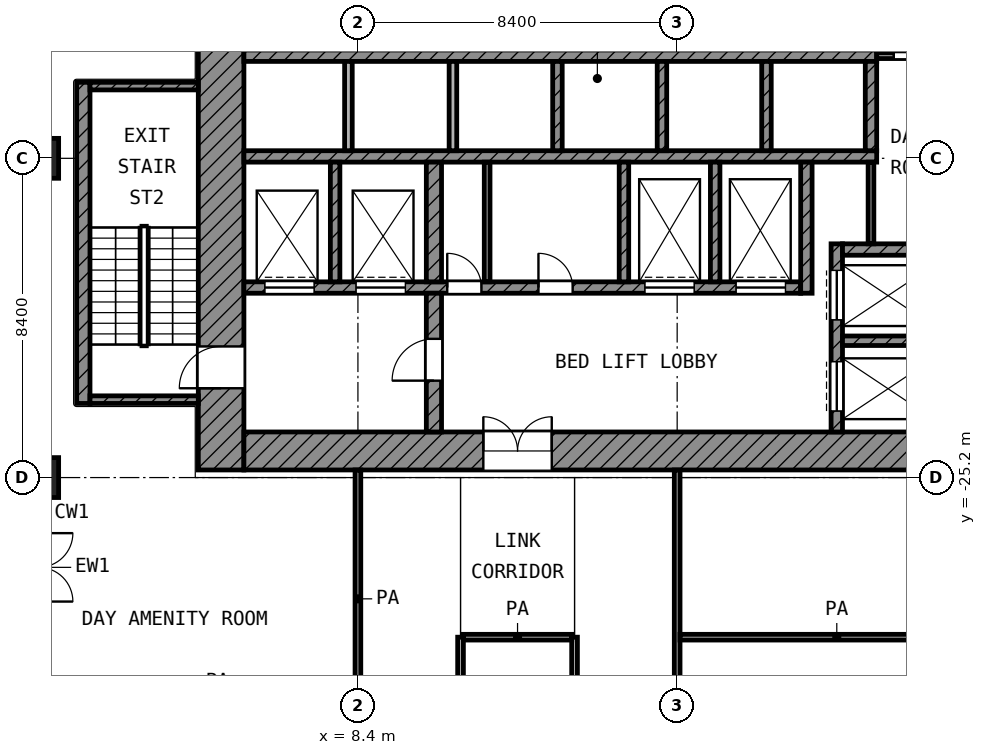
"""IFC4 building model, lengths in metres.
Left out: names, types, materials, properties, quantities, classifications, styles, units other than length and angle.
Written with IfcOpenShell. Run it as: python <this file> out.ifc"""

import sys

from ifc_helpers import new_model, si_unit, direction, frame, frame_2d, origin, origin_2d, place, context, subcontext, project, spatial, rectangle, extrude, element, fill, save


model = new_model("IFC4")
c1 = context("Model", 3, precision=1e-05, world=origin(), true_north=direction((0.0, 1.0)))
c2 = subcontext(c1, "Body", "Model", "MODEL_VIEW")
j1 = project(units=[si_unit("LENGTHUNIT", "METRE"), si_unit("PLANEANGLEUNIT", "RADIAN")], contexts=[c1])
p1 = place(None, origin())
s1 = spatial("IfcSite", under=j1, at=p1, CompositionType="ELEMENT")
p2 = place(p1, origin())
s2 = spatial("IfcBuilding", under=s1, at=p2, CompositionType="ELEMENT")
p3 = place(p2, frame((0.0, 0.0, 149.2)))
s3 = spatial("IfcBuildingStorey", under=s2, at=p3, CompositionType="ELEMENT", Elevation=149.2)
for number, where, z_axis, x_axis in (
    (1, (0.0, -16.8, 0.0), (0.0, 0.0, 1.0), (1.0, 0.0, 0.0)),
    (2, (0.0, -25.2, 0.0), (0.0, 0.0, 1.0), (1.0, 0.0, 0.0)),
):
    element("IfcColumn", number, at=place(p3, frame(where, z_axis=z_axis, x_axis=x_axis)), inside=s3, PredefinedType="COLUMN", context=c2, shape_type="SweptSolid", body=[
        extrude(rectangle(XDim=1.05, YDim=1.05, at=origin_2d()), origin(), (0.0, 0.0, 1.0), 4.2),
    ])
p4 = place(p3, frame((4.8, -25.0, 0.0), z_axis=(0.0, 0.0, 1.0), x_axis=(0.0, 1.0, 0.0)))
e3 = element("IfcWall", 3, at=p4, inside=s3, PredefinedType="SHEAR", context=c2, shape_type="SweptSolid", body=[
    extrude(rectangle(XDim=19.6, YDim=1.2, at=frame_2d((9.8, 0.0))), origin(), (0.0, 0.0, 1.0), 3.7),
])
p5 = place(p4, frame((11.45, 0.0, 0.0)))
e4 = element("IfcOpeningElement", 4, at=p5, cuts=e3, PredefinedType="OPENING", context=c2, shape_type="SweptSolid", body=[
    extrude(rectangle(XDim=1.1, YDim=2.1, at=frame_2d((0.55, 1.05))), frame((0.0, 0.61, 0.0), z_axis=(0.0, -1.0, 0.0), x_axis=(1.0, 0.0, 0.0)), (0.0, 0.0, 1.0), 1.22),
])
p6 = place(p4, frame((2.15, 0.0, 0.0)))
e5 = element("IfcOpeningElement", 5, at=p6, cuts=e3, PredefinedType="OPENING", context=c2, shape_type="SweptSolid", body=[
    extrude(rectangle(XDim=1.1, YDim=2.1, at=frame_2d((0.55, 1.05))), frame((0.0, 0.61, 0.0), z_axis=(0.0, -1.0, 0.0), x_axis=(1.0, 0.0, 0.0)), (0.0, 0.0, 1.0), 1.22),
])
p7 = place(p3, frame((5.4, -24.5, 0.0), z_axis=(0.0, 0.0, 1.0), x_axis=(1.0, 0.0, 0.0)))
e6 = element("IfcWall", 6, at=p7, inside=s3, PredefinedType="SHEAR", context=c2, shape_type="SweptSolid", body=[
    extrude(rectangle(XDim=18.6, YDim=1.0, at=frame_2d((9.3, 0.0))), origin(), (0.0, 0.0, 1.0), 3.7),
])
p8 = place(p7, frame((6.3, 0.0, 0.0)))
e7 = element("IfcOpeningElement", 7, at=p8, cuts=e6, PredefinedType="OPENING", context=c2, shape_type="SweptSolid", body=[
    extrude(rectangle(XDim=1.8, YDim=2.1, at=frame_2d((0.9, 1.05))), frame((0.0, 0.51, 0.0), z_axis=(0.0, -1.0, 0.0), x_axis=(1.0, 0.0, 0.0)), (0.0, 0.0, 1.0), 1.02),
])
for number, where, z_axis, x_axis in (
    (8, (5.4, -14.1, 0.0), (0.0, 0.0, 1.0), (1.0, 0.0, 0.0)),
    (9, (5.4, -16.75, 0.0), (0.0, 0.0, 1.0), (1.0, 0.0, 0.0)),
):
    element("IfcWall", number, at=place(p3, frame(where, z_axis=z_axis, x_axis=x_axis)), inside=s3, PredefinedType="SHEAR", context=c2, shape_type="SweptSolid", body=[
        extrude(rectangle(XDim=16.65, YDim=0.3, at=frame_2d((8.325, 0.0))), origin(), (0.0, 0.0, 1.0), 3.7),
    ])
p9 = place(p3, frame((5.4, -20.2, 0.0), z_axis=(0.0, 0.0, 1.0), x_axis=(1.0, 0.0, 0.0)))
e10 = element("IfcWall", 10, at=p9, inside=s3, PredefinedType="SHEAR", context=c2, shape_type="SweptSolid", body=[
    extrude(rectangle(XDim=14.65, YDim=0.3, at=frame_2d((7.325, 0.0))), origin(), (0.0, 0.0, 1.0), 3.7),
])
p10 = place(p9, frame((10.55, 0.0, 0.0)))
e11 = element("IfcOpeningElement", 11, at=p10, cuts=e10, PredefinedType="OPENING", context=c2, shape_type="SweptSolid", body=[
    extrude(rectangle(XDim=1.3, YDim=2.1, at=frame_2d((0.65, 1.05))), frame((0.0, 0.16, 0.0), z_axis=(0.0, -1.0, 0.0), x_axis=(1.0, 0.0, 0.0)), (0.0, 0.0, 1.0), 0.32),
])
p11 = place(p9, frame((12.95, 0.0, 0.0)))
e12 = element("IfcOpeningElement", 12, at=p11, cuts=e10, PredefinedType="OPENING", context=c2, shape_type="SweptSolid", body=[
    extrude(rectangle(XDim=1.3, YDim=2.1, at=frame_2d((0.65, 1.05))), frame((0.0, 0.16, 0.0), z_axis=(0.0, -1.0, 0.0), x_axis=(1.0, 0.0, 0.0)), (0.0, 0.0, 1.0), 0.32),
])
p12 = place(p9, frame((0.55, 0.0, 0.0)))
e13 = element("IfcOpeningElement", 13, at=p12, cuts=e10, PredefinedType="OPENING", context=c2, shape_type="SweptSolid", body=[
    extrude(rectangle(XDim=1.3, YDim=2.1, at=frame_2d((0.65, 1.05))), frame((0.0, 0.16, 0.0), z_axis=(0.0, -1.0, 0.0), x_axis=(1.0, 0.0, 0.0)), (0.0, 0.0, 1.0), 0.32),
])
p13 = place(p9, frame((2.95, 0.0, 0.0)))
e14 = element("IfcOpeningElement", 14, at=p13, cuts=e10, PredefinedType="OPENING", context=c2, shape_type="SweptSolid", body=[
    extrude(rectangle(XDim=1.3, YDim=2.1, at=frame_2d((0.65, 1.05))), frame((0.0, 0.16, 0.0), z_axis=(0.0, -1.0, 0.0), x_axis=(1.0, 0.0, 0.0)), (0.0, 0.0, 1.0), 0.32),
])
p14 = place(p9, frame((5.35, 0.0, 0.0)))
e15 = element("IfcOpeningElement", 15, at=p14, cuts=e10, PredefinedType="OPENING", context=c2, shape_type="SweptSolid", body=[
    extrude(rectangle(XDim=0.9, YDim=2.1, at=frame_2d((0.45, 1.05))), frame((0.0, 0.16, 0.0), z_axis=(0.0, -1.0, 0.0), x_axis=(1.0, 0.0, 0.0)), (0.0, 0.0, 1.0), 0.32),
])
p15 = place(p9, frame((7.75, 0.0, 0.0)))
e16 = element("IfcOpeningElement", 16, at=p15, cuts=e10, PredefinedType="OPENING", context=c2, shape_type="SweptSolid", body=[
    extrude(rectangle(XDim=0.9, YDim=2.1, at=frame_2d((0.45, 1.05))), frame((0.0, 0.16, 0.0), z_axis=(0.0, -1.0, 0.0), x_axis=(1.0, 0.0, 0.0)), (0.0, 0.0, 1.0), 0.32),
])
p16 = place(p3, frame((10.4, -24.0, 0.0), z_axis=(0.0, 0.0, 1.0), x_axis=(0.0, 1.0, 0.0)))
e17 = element("IfcWall", 17, at=p16, inside=s3, PredefinedType="SHEAR", context=c2, shape_type="SweptSolid", body=[
    extrude(rectangle(XDim=3.65, YDim=0.4, at=frame_2d((1.825, 0.0))), origin(), (0.0, 0.0, 1.0), 3.7),
])
p17 = place(p16, frame((1.35, 0.0, 0.0)))
e18 = element("IfcOpeningElement", 18, at=p17, cuts=e17, PredefinedType="OPENING", context=c2, shape_type="SweptSolid", body=[
    extrude(rectangle(XDim=1.1, YDim=2.1, at=frame_2d((0.55, 1.05))), frame((0.0, 0.21, 0.0), z_axis=(0.0, -1.0, 0.0), x_axis=(1.0, 0.0, 0.0)), (0.0, 0.0, 1.0), 0.42),
])
p18 = place(p3, frame((10.4, -20.05, 0.0), z_axis=(0.0, 0.0, 1.0), x_axis=(0.0, 1.0, 0.0)))
e19 = element("IfcWall", 19, at=p18, inside=s3, PredefinedType="SHEAR", context=c2, shape_type="SweptSolid", body=[
    extrude(rectangle(XDim=3.15, YDim=0.4, at=frame_2d((1.575, 0.0))), origin(), (0.0, 0.0, 1.0), 3.7),
])
p19 = place(p3, frame((20.2, -20.35, 0.0), z_axis=(0.0, 0.0, 1.0), x_axis=(0.0, 1.0, 0.0)))
e20 = element("IfcWall", 20, at=p19, inside=s3, PredefinedType="SHEAR", context=c2, shape_type="SweptSolid", body=[
    extrude(rectangle(XDim=3.45, YDim=0.3, at=frame_2d((1.725, 0.0))), origin(), (0.0, 0.0, 1.0), 3.7),
])
p20 = place(p3, frame((21.9, -16.6, 0.0), z_axis=(0.0, 0.0, 1.0), x_axis=(0.0, 1.0, 0.0)))
e21 = element("IfcWall", 21, at=p20, inside=s3, PredefinedType="SHEAR", context=c2, shape_type="SweptSolid", body=[
    extrude(rectangle(XDim=2.35, YDim=0.3, at=frame_2d((1.175, 0.0))), origin(), (0.0, 0.0, 1.0), 3.7),
])
p21 = place(p3, frame((21.15, -19.2, 0.0), z_axis=(0.0, 0.0, 1.0), x_axis=(1.0, 0.0, 0.0)))
e22 = element("IfcWall", 22, at=p21, inside=s3, PredefinedType="SHEAR", context=c2, shape_type="SweptSolid", body=[
    extrude(rectangle(XDim=2.85, YDim=0.3, at=frame_2d((1.425, 0.0))), origin(), (0.0, 0.0, 1.0), 3.7),
])
p22 = place(p3, frame((21.0, -24.0, 0.0), z_axis=(0.0, 0.0, 1.0), x_axis=(0.0, 1.0, 0.0)))
e23 = element("IfcWall", 23, at=p22, inside=s3, PredefinedType="SHEAR", context=c2, shape_type="SweptSolid", body=[
    extrude(rectangle(XDim=4.95, YDim=0.3, at=frame_2d((2.475, 0.0))), origin(), (0.0, 0.0, 1.0), 3.7),
])
p23 = place(p22, frame((2.95, 0.0, 0.0)))
e24 = element("IfcOpeningElement", 24, at=p23, cuts=e23, PredefinedType="OPENING", context=c2, shape_type="SweptSolid", body=[
    extrude(rectangle(XDim=1.3, YDim=2.1, at=frame_2d((0.65, 1.05))), frame((0.0, 0.16, 0.0), z_axis=(0.0, -1.0, 0.0), x_axis=(1.0, 0.0, 0.0)), (0.0, 0.0, 1.0), 0.32),
])
p24 = place(p22, frame((0.55, 0.0, 0.0)))
e25 = element("IfcOpeningElement", 25, at=p24, cuts=e23, PredefinedType="OPENING", context=c2, shape_type="SweptSolid", body=[
    extrude(rectangle(XDim=1.3, YDim=2.1, at=frame_2d((0.65, 1.05))), frame((0.0, 0.16, 0.0), z_axis=(0.0, -1.0, 0.0), x_axis=(1.0, 0.0, 0.0)), (0.0, 0.0, 1.0), 0.32),
])
p25 = place(p3, frame((21.15, -21.6, 0.0), z_axis=(0.0, 0.0, 1.0), x_axis=(1.0, 0.0, 0.0)))
e26 = element("IfcWall", 26, at=p25, inside=s3, PredefinedType="SHEAR", context=c2, shape_type="SweptSolid", body=[
    extrude(rectangle(XDim=2.85, YDim=0.25, at=frame_2d((1.425, 0.0))), origin(), (0.0, 0.0, 1.0), 3.7),
])
for number, where, z_axis, x_axis in (
    (27, (7.8, -20.05, 0.0), (0.0, 0.0, 1.0), (0.0, 1.0, 0.0)),
    (28, (15.4, -20.05, 0.0), (0.0, 0.0, 1.0), (0.0, 1.0, 0.0)),
    (29, (17.8, -20.05, 0.0), (0.0, 0.0, 1.0), (0.0, 1.0, 0.0)),
):
    element("IfcWall", number, at=place(p3, frame(where, z_axis=z_axis, x_axis=x_axis)), inside=s3, PredefinedType="SHEAR", context=c2, shape_type="SweptSolid", body=[
        extrude(rectangle(XDim=3.15, YDim=0.25, at=frame_2d((1.575, 0.0))), origin(), (0.0, 0.0, 1.0), 3.7),
    ])
for number, where, z_axis, x_axis in (
    (30, (8.15, -16.6, 0.0), (0.0, 0.0, 1.0), (0.0, 1.0, 0.0)),
    (31, (10.9, -16.6, 0.0), (0.0, 0.0, 1.0), (0.0, 1.0, 0.0)),
):
    element("IfcWall", number, at=place(p3, frame(where, z_axis=z_axis, x_axis=x_axis)), inside=s3, PredefinedType="PARTITIONING", context=c2, shape_type="SweptSolid", body=[
        extrude(rectangle(XDim=2.35, YDim=0.2, at=frame_2d((1.175, 0.0))), origin(), (0.0, 0.0, 1.0), 3.7),
    ])
for number, where, z_axis, x_axis in (
    (32, (13.65, -16.6, 0.0), (0.0, 0.0, 1.0), (0.0, 1.0, 0.0)),
    (33, (16.4, -16.6, 0.0), (0.0, 0.0, 1.0), (0.0, 1.0, 0.0)),
    (34, (19.15, -16.6, 0.0), (0.0, 0.0, 1.0), (0.0, 1.0, 0.0)),
):
    element("IfcWall", number, at=place(p3, frame(where, z_axis=z_axis, x_axis=x_axis)), inside=s3, PredefinedType="SHEAR", context=c2, shape_type="SweptSolid", body=[
        extrude(rectangle(XDim=2.35, YDim=0.25, at=frame_2d((1.175, 0.0))), origin(), (0.0, 0.0, 1.0), 3.7),
    ])
p26 = place(p3, frame((21.9, -19.05, 0.0), z_axis=(0.0, 0.0, 1.0), x_axis=(0.0, 1.0, 0.0)))
e35 = element("IfcWall", 35, at=p26, inside=s3, PredefinedType="PARTITIONING", context=c2, shape_type="SweptSolid", body=[
    extrude(rectangle(XDim=2.15, YDim=0.15, at=frame_2d((1.075, 0.0))), origin(), (0.0, 0.0, 1.0), 3.7),
])
p27 = place(p3, frame((22.05, -14.1, 0.0), z_axis=(0.0, 0.0, 1.0), x_axis=(1.0, 0.0, 0.0)))
e36 = element("IfcWall", 36, at=p27, inside=s3, PredefinedType="PARTITIONING", context=c2, shape_type="SweptSolid", body=[
    extrude(rectangle(XDim=1.95, YDim=0.15, at=frame_2d((0.975, 0.0))), origin(), (0.0, 0.0, 1.0), 3.7),
])
p28 = place(p27, frame((0.45, 0.0, 0.0)))
e37 = element("IfcOpeningElement", 37, at=p28, cuts=e36, PredefinedType="OPENING", context=c2, shape_type="SweptSolid", body=[
    extrude(rectangle(XDim=0.9, YDim=2.1, at=frame_2d((0.45, 1.05))), frame((0.0, 0.085, 0.0), z_axis=(0.0, -1.0, 0.0), x_axis=(1.0, 0.0, 0.0)), (0.0, 0.0, 1.0), 0.17),
])
p29 = place(p3, frame((11.8, -20.05, 0.0), z_axis=(0.0, 0.0, 1.0), x_axis=(0.0, 1.0, 0.0)))
e38 = element("IfcWall", 38, at=p29, inside=s3, PredefinedType="PARTITIONING", context=c2, shape_type="SweptSolid", body=[
    extrude(rectangle(XDim=3.15, YDim=0.15, at=frame_2d((1.575, 0.0))), origin(), (0.0, 0.0, 1.0), 3.7),
])
p30 = place(p3, frame((1.175, -23.25, 0.0), z_axis=(0.0, 0.0, 1.0), x_axis=(0.0, 1.0, 0.0)))
e39 = element("IfcWall", 39, at=p30, inside=s3, PredefinedType="SHEAR", context=c2, shape_type="SweptSolid", body=[
    extrude(rectangle(XDim=8.45, YDim=0.35, at=frame_2d((4.225, 0.0))), origin(), (0.0, 0.0, 1.0), 3.7),
])
for number, where, z_axis, x_axis in (
    (40, (1.35, -14.9, 0.0), (0.0, 0.0, 1.0), (1.0, 0.0, 0.0)),
    (41, (1.35, -23.15, 0.0), (0.0, 0.0, 1.0), (1.0, 0.0, 0.0)),
):
    element("IfcWall", number, at=place(p3, frame(where, z_axis=z_axis, x_axis=x_axis)), inside=s3, PredefinedType="SHEAR", context=c2, shape_type="SweptSolid", body=[
        extrude(rectangle(XDim=2.85, YDim=0.2, at=frame_2d((1.425, 0.0))), origin(), (0.0, 0.0, 1.0), 3.7),
    ])
p31 = place(p3, frame((11.175, -29.4, 0.0), z_axis=(0.0, 0.0, 1.0), x_axis=(1.0, 0.0, 0.0)))
e42 = element("IfcWall", 42, at=p31, inside=s3, PredefinedType="PARTITIONING", context=c2, shape_type="SweptSolid", body=[
    extrude(rectangle(XDim=2.85, YDim=0.15, at=frame_2d((1.425, 0.0))), origin(), (0.0, 0.0, 1.0), 3.7),
])
p32 = place(p3, frame((16.875, -29.4, 0.0), z_axis=(0.0, 0.0, 1.0), x_axis=(1.0, 0.0, 0.0)))
e43 = element("IfcWall", 43, at=p32, inside=s3, PredefinedType="PARTITIONING", context=c2, shape_type="SweptSolid", body=[
    extrude(rectangle(XDim=8.25, YDim=0.15, at=frame_2d((4.125, 0.0))), origin(), (0.0, 0.0, 1.0), 3.7),
])
p33 = place(p3, frame((8.4, -31.782, 0.0), z_axis=(0.0, 0.0, 1.0), x_axis=(0.0, 1.0, 0.0)))
e44 = element("IfcWall", 44, at=p33, inside=s3, PredefinedType="PARTITIONING", context=c2, shape_type="SweptSolid", body=[
    extrude(rectangle(XDim=6.782, YDim=0.15, at=frame_2d((3.391, 0.0))), origin(), (0.0, 0.0, 1.0), 3.7),
])
p34 = place(p3, frame((11.1, -46.7, 0.0), z_axis=(0.0, 0.0, 1.0), x_axis=(0.0, 1.0, 0.0)))
e45 = element("IfcWall", 45, at=p34, inside=s3, PredefinedType="PARTITIONING", context=c2, shape_type="SweptSolid", body=[
    extrude(rectangle(XDim=17.3, YDim=0.15, at=frame_2d((8.65, 0.0))), origin(), (0.0, 0.0, 1.0), 3.7),
])
p35 = place(p34, frame((14.7, 0.0, 0.0)))
e46 = element("IfcOpeningElement", 46, at=p35, cuts=e45, PredefinedType="OPENING", context=c2, shape_type="SweptSolid", body=[
    extrude(rectangle(XDim=1.0, YDim=2.1, at=frame_2d((0.5, 1.05))), frame((0.0, 0.085, 0.0), z_axis=(0.0, -1.0, 0.0), x_axis=(1.0, 0.0, 0.0)), (0.0, 0.0, 1.0), 0.17),
])
p36 = place(p3, frame((14.1, -46.7, 0.0), z_axis=(0.0, 0.0, 1.0), x_axis=(0.0, 1.0, 0.0)))
e47 = element("IfcWall", 47, at=p36, inside=s3, PredefinedType="PARTITIONING", context=c2, shape_type="SweptSolid", body=[
    extrude(rectangle(XDim=17.3, YDim=0.15, at=frame_2d((8.65, 0.0))), origin(), (0.0, 0.0, 1.0), 3.7),
])
p37 = place(p36, frame((5.9, 0.0, 0.0)))
e48 = element("IfcOpeningElement", 48, at=p37, cuts=e47, PredefinedType="OPENING", context=c2, shape_type="SweptSolid", body=[
    extrude(rectangle(XDim=1.2, YDim=2.1, at=frame_2d((0.6, 1.05))), frame((0.0, 0.085, 0.0), z_axis=(0.0, -1.0, 0.0), x_axis=(1.0, 0.0, 0.0)), (0.0, 0.0, 1.0), 0.17),
])
p38 = place(p3, frame((16.8, -58.72, 0.0), z_axis=(0.0, 0.0, 1.0), x_axis=(0.0, 1.0, 0.0)))
e49 = element("IfcWall", 49, at=p38, inside=s3, PredefinedType="PARTITIONING", context=c2, shape_type="SweptSolid", body=[
    extrude(rectangle(XDim=33.72, YDim=0.15, at=frame_2d((16.86, 0.0))), origin(), (0.0, 0.0, 1.0), 3.7),
])
p39 = place(p38, frame((25.72, 0.0, 0.0)))
e50 = element("IfcOpeningElement", 50, at=p39, cuts=e49, PredefinedType="OPENING", context=c2, shape_type="SweptSolid", body=[
    extrude(rectangle(XDim=1.5, YDim=2.1, at=frame_2d((0.75, 1.05))), frame((0.0, 0.085, 0.0), z_axis=(0.0, -1.0, 0.0), x_axis=(1.0, 0.0, 0.0)), (0.0, 0.0, 1.0), 0.17),
])
p40 = place(p38, frame((17.72, 0.0, 0.0)))
e51 = element("IfcOpeningElement", 51, at=p40, cuts=e49, PredefinedType="OPENING", context=c2, shape_type="SweptSolid", body=[
    extrude(rectangle(XDim=1.2, YDim=2.1, at=frame_2d((0.6, 1.05))), frame((0.0, 0.085, 0.0), z_axis=(0.0, -1.0, 0.0), x_axis=(1.0, 0.0, 0.0)), (0.0, 0.0, 1.0), 0.17),
])
p41 = place(p38, frame((14.92, 0.0, 0.0)))
e52 = element("IfcOpeningElement", 52, at=p41, cuts=e49, PredefinedType="OPENING", context=c2, shape_type="SweptSolid", body=[
    extrude(rectangle(XDim=1.2, YDim=2.1, at=frame_2d((0.6, 1.05))), frame((0.0, 0.085, 0.0), z_axis=(0.0, -1.0, 0.0), x_axis=(1.0, 0.0, 0.0)), (0.0, 0.0, 1.0), 0.17),
])
p42 = place(p38, frame((9.02, 0.0, 0.0)))
e53 = element("IfcOpeningElement", 53, at=p42, cuts=e49, PredefinedType="OPENING", context=c2, shape_type="SweptSolid", body=[
    extrude(rectangle(XDim=0.9, YDim=2.1, at=frame_2d((0.45, 1.05))), frame((0.0, 0.085, 0.0), z_axis=(0.0, -1.0, 0.0), x_axis=(1.0, 0.0, 0.0)), (0.0, 0.0, 1.0), 0.17),
])
p43 = place(p38, frame((3.37, 0.0, 0.0)))
e54 = element("IfcOpeningElement", 54, at=p43, cuts=e49, PredefinedType="OPENING", context=c2, shape_type="SweptSolid", body=[
    extrude(rectangle(XDim=1.5, YDim=2.1, at=frame_2d((0.75, 1.05))), frame((0.0, 0.085, 0.0), z_axis=(0.0, -1.0, 0.0), x_axis=(1.0, 0.0, 0.0)), (0.0, 0.0, 1.0), 0.17),
])
p44 = place(p23, origin())
e55 = element("IfcDoor", 55, at=p44, inside=s3, OperationType="DOUBLE_DOOR_SLIDING", PredefinedType="DOOR", context=c2, shape_type="SweptSolid", body=[
    extrude(rectangle(XDim=1.3, YDim=2.1, at=frame_2d((0.65, 1.05))), frame((0.0, 0.025, 0.0), z_axis=(0.0, -1.0, 0.0), x_axis=(1.0, 0.0, 0.0)), (0.0, 0.0, 1.0), 0.05),
])
fill(e24, e55)
p45 = place(p24, origin())
e56 = element("IfcDoor", 56, at=p45, inside=s3, OperationType="DOUBLE_DOOR_SLIDING", PredefinedType="DOOR", context=c2, shape_type="SweptSolid", body=[
    extrude(rectangle(XDim=1.3, YDim=2.1, at=frame_2d((0.65, 1.05))), frame((0.0, 0.025, 0.0), z_axis=(0.0, -1.0, 0.0), x_axis=(1.0, 0.0, 0.0)), (0.0, 0.0, 1.0), 0.05),
])
fill(e25, e56)
p46 = place(p10, origin())
e57 = element("IfcDoor", 57, at=p46, inside=s3, OperationType="DOUBLE_DOOR_SLIDING", PredefinedType="DOOR", context=c2, shape_type="SweptSolid", body=[
    extrude(rectangle(XDim=1.3, YDim=2.1, at=frame_2d((0.65, 1.05))), frame((0.0, 0.025, 0.0), z_axis=(0.0, -1.0, 0.0), x_axis=(1.0, 0.0, 0.0)), (0.0, 0.0, 1.0), 0.05),
])
fill(e11, e57)
p47 = place(p11, origin())
e58 = element("IfcDoor", 58, at=p47, inside=s3, OperationType="DOUBLE_DOOR_SLIDING", PredefinedType="DOOR", context=c2, shape_type="SweptSolid", body=[
    extrude(rectangle(XDim=1.3, YDim=2.1, at=frame_2d((0.65, 1.05))), frame((0.0, 0.025, 0.0), z_axis=(0.0, -1.0, 0.0), x_axis=(1.0, 0.0, 0.0)), (0.0, 0.0, 1.0), 0.05),
])
fill(e12, e58)
p48 = place(p12, origin())
e59 = element("IfcDoor", 59, at=p48, inside=s3, OperationType="DOUBLE_DOOR_SLIDING", PredefinedType="DOOR", context=c2, shape_type="SweptSolid", body=[
    extrude(rectangle(XDim=1.3, YDim=2.1, at=frame_2d((0.65, 1.05))), frame((0.0, 0.025, 0.0), z_axis=(0.0, -1.0, 0.0), x_axis=(1.0, 0.0, 0.0)), (0.0, 0.0, 1.0), 0.05),
])
fill(e13, e59)
p49 = place(p13, origin())
e60 = element("IfcDoor", 60, at=p49, inside=s3, OperationType="DOUBLE_DOOR_SLIDING", PredefinedType="DOOR", context=c2, shape_type="SweptSolid", body=[
    extrude(rectangle(XDim=1.3, YDim=2.1, at=frame_2d((0.65, 1.05))), frame((0.0, 0.025, 0.0), z_axis=(0.0, -1.0, 0.0), x_axis=(1.0, 0.0, 0.0)), (0.0, 0.0, 1.0), 0.05),
])
fill(e14, e60)
p50 = place(p6, origin())
e61 = element("IfcDoor", 61, at=p50, inside=s3, OperationType="SINGLE_SWING_LEFT", PredefinedType="DOOR", context=c2, shape_type="SweptSolid", body=[
    extrude(rectangle(XDim=1.1, YDim=2.1, at=frame_2d((0.55, 1.05))), frame((0.0, 0.025, 0.0), z_axis=(0.0, -1.0, 0.0), x_axis=(1.0, 0.0, 0.0)), (0.0, 0.0, 1.0), 0.05),
])
fill(e5, e61)
p51 = place(p17, origin())
e62 = element("IfcDoor", 62, at=p51, inside=s3, OperationType="SINGLE_SWING_LEFT", PredefinedType="DOOR", context=c2, shape_type="SweptSolid", body=[
    extrude(rectangle(XDim=1.1, YDim=2.1, at=frame_2d((0.55, 1.05))), frame((0.0, 0.025, 0.0), z_axis=(0.0, -1.0, 0.0), x_axis=(1.0, 0.0, 0.0)), (0.0, 0.0, 1.0), 0.05),
])
fill(e18, e62)
p52 = place(p8, origin())
e63 = element("IfcDoor", 63, at=p52, inside=s3, OperationType="DOUBLE_DOOR_SINGLE_SWING", PredefinedType="DOOR", context=c2, shape_type="SweptSolid", body=[
    extrude(rectangle(XDim=1.8, YDim=2.1, at=frame_2d((0.9, 1.05))), frame((0.0, 0.025, 0.0), z_axis=(0.0, -1.0, 0.0), x_axis=(1.0, 0.0, 0.0)), (0.0, 0.0, 1.0), 0.05),
])
fill(e7, e63)
p53 = place(p28, origin())
e64 = element("IfcDoor", 64, at=p53, inside=s3, OperationType="SINGLE_SWING_LEFT", PredefinedType="DOOR", context=c2, shape_type="SweptSolid", body=[
    extrude(rectangle(XDim=0.9, YDim=2.1, at=frame_2d((0.45, 1.05))), frame((0.0, 0.025, 0.0), z_axis=(0.0, -1.0, 0.0), x_axis=(1.0, 0.0, 0.0)), (0.0, 0.0, 1.0), 0.05),
])
fill(e37, e64)
p54 = place(p14, origin())
e65 = element("IfcDoor", 65, at=p54, inside=s3, OperationType="SINGLE_SWING_LEFT", PredefinedType="DOOR", context=c2, shape_type="SweptSolid", body=[
    extrude(rectangle(XDim=0.9, YDim=2.1, at=frame_2d((0.45, 1.05))), frame((0.0, 0.025, 0.0), z_axis=(0.0, -1.0, 0.0), x_axis=(1.0, 0.0, 0.0)), (0.0, 0.0, 1.0), 0.05),
])
fill(e15, e65)
p55 = place(p15, origin())
e66 = element("IfcDoor", 66, at=p55, inside=s3, OperationType="SINGLE_SWING_LEFT", PredefinedType="DOOR", context=c2, shape_type="SweptSolid", body=[
    extrude(rectangle(XDim=0.9, YDim=2.1, at=frame_2d((0.45, 1.05))), frame((0.0, 0.025, 0.0), z_axis=(0.0, -1.0, 0.0), x_axis=(1.0, 0.0, 0.0)), (0.0, 0.0, 1.0), 0.05),
])
fill(e16, e66)
save(model, sys.argv[1])
